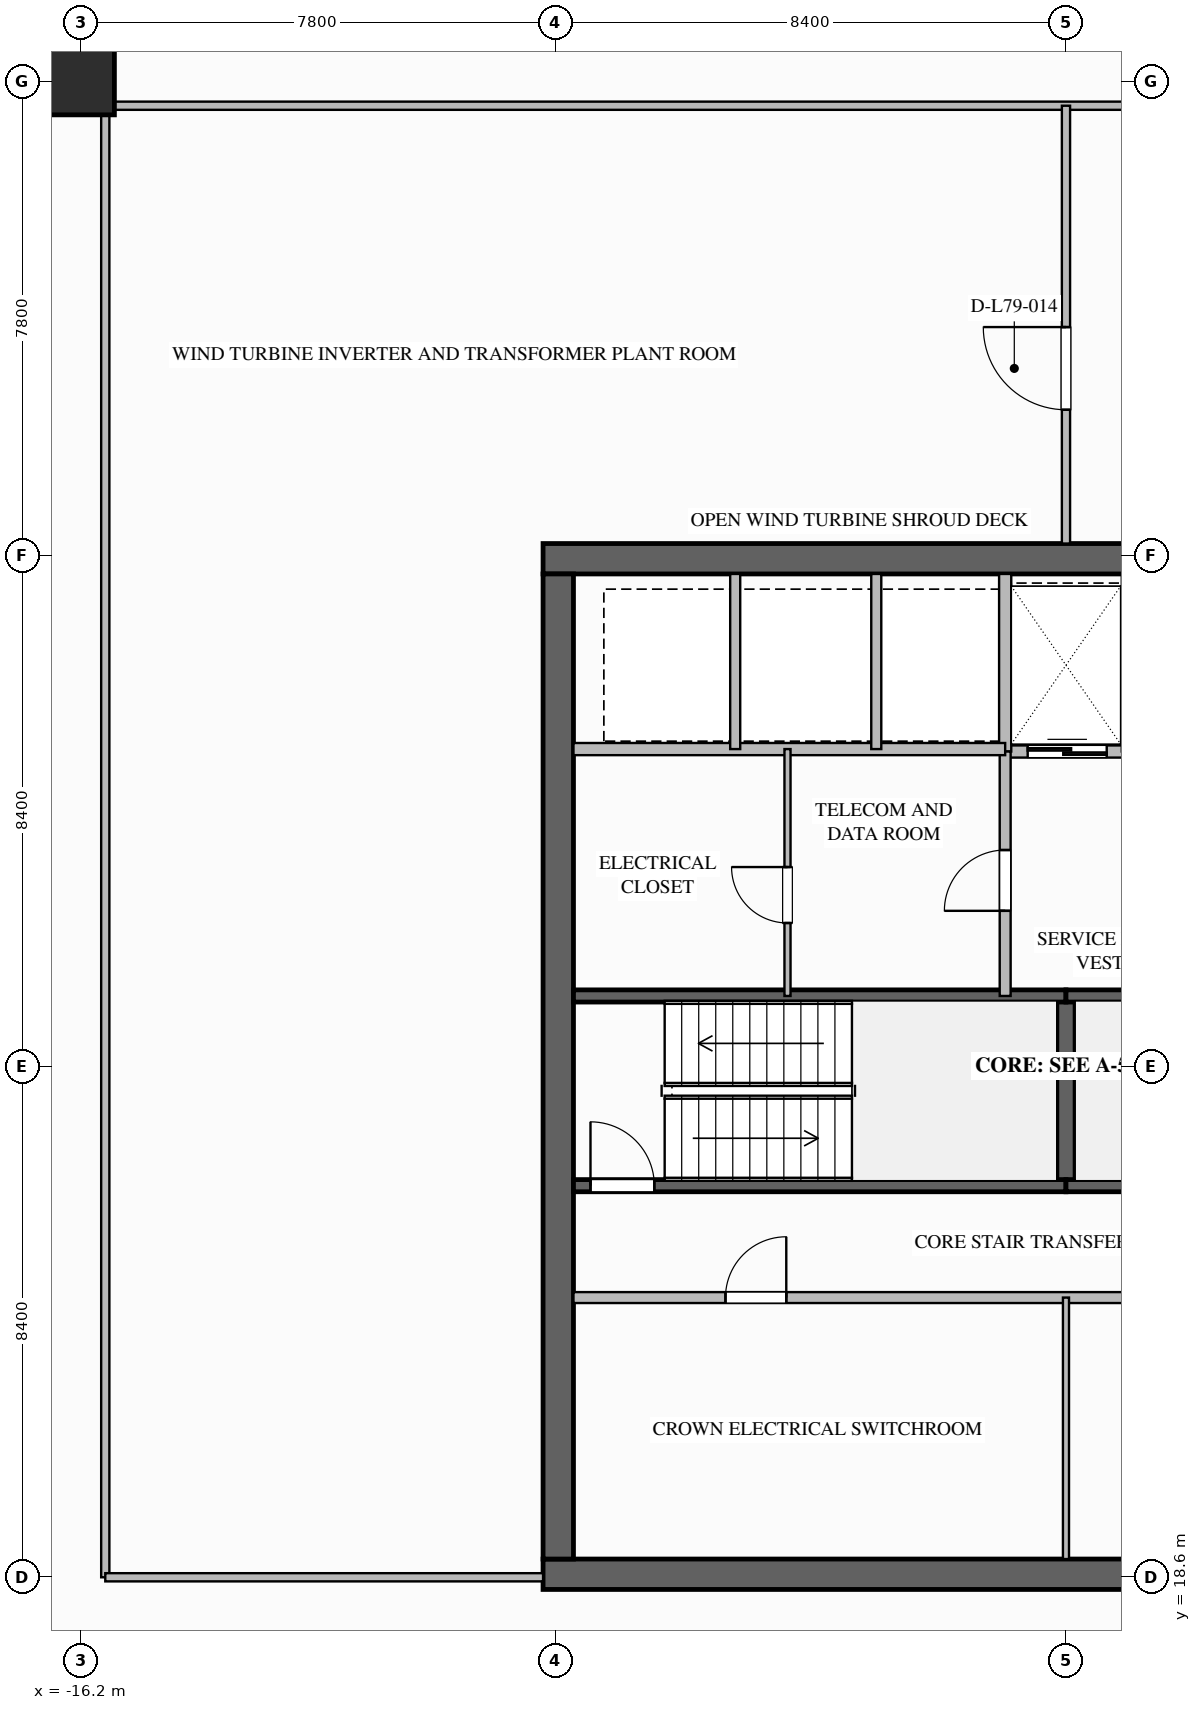
"""IFC4 building model, lengths in metres.
Left out: names, types, materials, properties, quantities, classifications, styles, units other than length and angle.
Written with IfcOpenShell. Run it as: python <this file> out.ifc"""

import sys

from ifc_helpers import new_model, si_unit, direction, frame, frame_2d, origin, origin_2d, place, context, subcontext, project, spatial, rectangle, extrude, element, fill, save


model = new_model("IFC4")
c1 = context("Model", 3, precision=1e-05, world=origin(), true_north=direction((0.0, 1.0)))
c2 = subcontext(c1, "Body", "Model", "MODEL_VIEW")
j1 = project(units=[si_unit("LENGTHUNIT", "METRE"), si_unit("PLANEANGLEUNIT", "RADIAN")], contexts=[c1])
p1 = place(None, origin())
s1 = spatial("IfcSite", under=j1, at=p1, CompositionType="ELEMENT")
p2 = place(p1, origin())
s2 = spatial("IfcBuilding", under=s1, at=p2, CompositionType="ELEMENT")
p3 = place(p2, frame((0.0, 0.0, 303.0)))
s3 = spatial("IfcBuildingStorey", under=s2, at=p3, CompositionType="ELEMENT", Elevation=303.0)
for number, where, z_axis, x_axis in (
    (1, (-8.6, 35.35, 0.0), (0.0, 0.0, 1.0), (1.0, 0.0, 0.0)),
    (2, (8.6, 18.65, 0.0), (0.0, 0.0, 1.0), (-1.0, 0.0, 0.0)),
):
    element("IfcWall", number, at=place(p3, frame(where, z_axis=z_axis, x_axis=x_axis)), inside=s3, PredefinedType="SHEAR", context=c2, shape_type="SweptSolid", body=[
        extrude(rectangle(XDim=17.2, YDim=0.5, at=frame_2d((8.6, 0.0))), origin(), (0.0, 0.0, 1.0), 4.2),
    ])
p4 = place(p3, frame((-8.35, 18.9, 0.0), z_axis=(0.0, 0.0, 1.0), x_axis=(0.0, 1.0, 0.0)))
e3 = element("IfcWall", 3, at=p4, inside=s3, PredefinedType="SHEAR", context=c2, shape_type="SweptSolid", body=[
    extrude(rectangle(XDim=16.2, YDim=0.5, at=frame_2d((8.1, 0.0))), origin(), (0.0, 0.0, 1.0), 4.2),
])
p5 = place(p3, frame((-16.2, 43.2, 0.0), z_axis=(0.0, 0.0, 1.0), x_axis=(1.0, 0.0, 0.0)))
e4 = element("IfcColumn", 4, at=p5, inside=s3, PredefinedType="COLUMN", context=c2, shape_type="SweptSolid", body=[
    extrude(rectangle(XDim=1.1, YDim=1.1, at=origin_2d()), origin(), (0.0, 0.0, 1.0), 4.2),
])
p6 = place(p3, frame((0.0, 25.04, 0.0), z_axis=(0.0, 0.0, 1.0), x_axis=(0.0, 1.0, 0.0)))
e5 = element("IfcWall", 5, at=p6, inside=s3, PredefinedType="SOLIDWALL", context=c2, shape_type="SweptSolid", body=[
    extrude(rectangle(XDim=3.12, YDim=0.3, at=frame_2d((1.56, 0.0))), origin(), (0.0, 0.0, 1.0), 3.85),
])
p7 = place(p3, frame((-8.1, 25.04, 0.0), z_axis=(0.0, 0.0, 1.0), x_axis=(1.0, 0.0, 0.0)))
e6 = element("IfcWall", 6, at=p7, inside=s3, PredefinedType="SOLIDWALL", context=c2, shape_type="SweptSolid", body=[
    extrude(rectangle(XDim=8.1, YDim=0.2, at=frame_2d((4.05, 0.0))), origin(), (0.0, 0.0, 1.0), 3.85),
])
p8 = place(p7, frame((0.28, 0.0, 0.0)))
e7 = element("IfcOpeningElement", 7, at=p8, cuts=e6, PredefinedType="OPENING", context=c2, shape_type="SweptSolid", body=[
    extrude(rectangle(XDim=1.05, YDim=2.1, at=frame_2d((0.525, 1.05))), frame((0.0, 0.11, 0.0), z_axis=(0.0, -1.0, 0.0), x_axis=(1.0, 0.0, 0.0)), (0.0, 0.0, 1.0), 0.22),
])
for number, where, z_axis, x_axis in (
    (8, (-8.1, 28.16, 0.0), (0.0, 0.0, 1.0), (1.0, 0.0, 0.0)),
    (9, (0.0, 25.04, 0.0), (0.0, 0.0, 1.0), (1.0, 0.0, 0.0)),
):
    element("IfcWall", number, at=place(p3, frame(where, z_axis=z_axis, x_axis=x_axis)), inside=s3, PredefinedType="SOLIDWALL", context=c2, shape_type="SweptSolid", body=[
        extrude(rectangle(XDim=8.1, YDim=0.2, at=frame_2d((4.05, 0.0))), origin(), (0.0, 0.0, 1.0), 3.85),
    ])
p9 = place(p3, frame((8.1, 28.16, 0.0), z_axis=(0.0, 0.0, 1.0), x_axis=(-1.0, 0.0, 0.0)))
e10 = element("IfcWall", 10, at=p9, inside=s3, PredefinedType="SOLIDWALL", context=c2, shape_type="SweptSolid", body=[
    extrude(rectangle(XDim=8.1, YDim=0.2, at=frame_2d((4.05, 0.0))), origin(), (0.0, 0.0, 1.0), 3.85),
])
p10 = place(p9, frame((0.28, 0.0, 0.0)))
e11 = element("IfcOpeningElement", 11, at=p10, cuts=e10, PredefinedType="OPENING", context=c2, shape_type="SweptSolid", body=[
    extrude(rectangle(XDim=1.05, YDim=2.1, at=frame_2d((0.525, 1.05))), frame((0.0, 0.11, 0.0), z_axis=(0.0, -1.0, 0.0), x_axis=(1.0, 0.0, 0.0)), (0.0, 0.0, 1.0), 0.22),
])
p11 = place(p3, frame((-1.0, 32.18, 0.0), z_axis=(0.0, 0.0, 1.0), x_axis=(1.0, 0.0, 0.0)))
e12 = element("IfcWall", 12, at=p11, inside=s3, PredefinedType="SOLIDWALL", context=c2, shape_type="SweptSolid", body=[
    extrude(rectangle(XDim=4.1, YDim=0.2, at=frame_2d((2.05, 0.0))), origin(), (0.0, 0.0, 1.0), 3.85),
])
p12 = place(p11, frame((0.37, 0.0, 0.0)))
e13 = element("IfcOpeningElement", 13, at=p12, cuts=e12, PredefinedType="OPENING", context=c2, shape_type="SweptSolid", body=[
    extrude(rectangle(XDim=1.3, YDim=2.2, at=frame_2d((0.65, 1.1))), frame((0.0, 0.11, 0.0), z_axis=(0.0, -1.0, 0.0), x_axis=(1.0, 0.0, 0.0)), (0.0, 0.0, 1.0), 0.22),
])
p13 = place(p11, frame((2.33, 0.0, 0.0)))
e14 = element("IfcOpeningElement", 14, at=p13, cuts=e12, PredefinedType="OPENING", context=c2, shape_type="SweptSolid", body=[
    extrude(rectangle(XDim=1.3, YDim=2.2, at=frame_2d((0.65, 1.1))), frame((0.0, 0.11, 0.0), z_axis=(0.0, -1.0, 0.0), x_axis=(1.0, 0.0, 0.0)), (0.0, 0.0, 1.0), 0.22),
])
p14 = place(p3, frame((-1.0, 32.18, 0.0), z_axis=(0.0, 0.0, 1.0), x_axis=(0.0, 1.0, 0.0)))
e15 = element("IfcWall", 15, at=p14, inside=s3, PredefinedType="SOLIDWALL", context=c2, shape_type="SweptSolid", body=[
    extrude(rectangle(XDim=2.92, YDim=0.2, at=frame_2d((1.46, 0.0))), origin(), (0.0, 0.0, 1.0), 3.85),
])
p15 = place(p3, frame((-1.0, 28.16, 0.0), z_axis=(0.0, 0.0, 1.0), x_axis=(0.0, 1.0, 0.0)))
e16 = element("IfcWall", 16, at=p15, inside=s3, PredefinedType="SOLIDWALL", context=c2, shape_type="SweptSolid", body=[
    extrude(rectangle(XDim=4.02, YDim=0.18, at=frame_2d((2.01, 0.0))), origin(), (0.0, 0.0, 1.0), 3.85),
])
p16 = place(p15, frame((1.4, 0.0, 0.0)))
e17 = element("IfcOpeningElement", 17, at=p16, cuts=e16, PredefinedType="OPENING", context=c2, shape_type="SweptSolid", body=[
    extrude(rectangle(XDim=1.0, YDim=2.1, at=frame_2d((0.5, 1.05))), frame((0.0, 0.1, 0.0), z_axis=(0.0, -1.0, 0.0), x_axis=(1.0, 0.0, 0.0)), (0.0, 0.0, 1.0), 0.2),
])
p17 = place(p3, frame((-8.1, 32.22, 0.0), z_axis=(0.0, 0.0, 1.0), x_axis=(1.0, 0.0, 0.0)))
e18 = element("IfcWall", 18, at=p17, inside=s3, PredefinedType="SOLIDWALL", context=c2, shape_type="SweptSolid", body=[
    extrude(rectangle(XDim=7.1, YDim=0.2, at=frame_2d((3.55, 0.0))), origin(), (0.0, 0.0, 1.0), 3.85),
])
for number, where, z_axis, x_axis in (
    (19, (-5.44, 32.22, 0.0), (0.0, 0.0, 1.0), (0.0, 1.0, 0.0)),
    (20, (-3.12, 32.22, 0.0), (0.0, 0.0, 1.0), (0.0, 1.0, 0.0)),
):
    element("IfcWall", number, at=place(p3, frame(where, z_axis=z_axis, x_axis=x_axis)), inside=s3, PredefinedType="PARTITIONING", context=c2, shape_type="SweptSolid", body=[
        extrude(rectangle(XDim=2.88, YDim=0.165, at=frame_2d((1.44, 0.0))), origin(), (0.0, 0.0, 1.0), 3.85),
    ])
p18 = place(p3, frame((-4.58, 28.16, 0.0), z_axis=(0.0, 0.0, 1.0), x_axis=(0.0, 1.0, 0.0)))
e21 = element("IfcWall", 21, at=p18, inside=s3, PredefinedType="PARTITIONING", context=c2, shape_type="SweptSolid", body=[
    extrude(rectangle(XDim=4.06, YDim=0.1, at=frame_2d((2.03, 0.0))), origin(), (0.0, 0.0, 1.0), 3.85),
])
p19 = place(p18, frame((1.2, 0.0, 0.0)))
e22 = element("IfcOpeningElement", 22, at=p19, cuts=e21, PredefinedType="OPENING", context=c2, shape_type="SweptSolid", body=[
    extrude(rectangle(XDim=0.92, YDim=2.1, at=frame_2d((0.46, 1.05))), frame((0.0, 0.06, 0.0), z_axis=(0.0, -1.0, 0.0), x_axis=(1.0, 0.0, 0.0)), (0.0, 0.0, 1.0), 0.12),
])
p20 = place(p3, frame((-8.1, 23.2, 0.0), z_axis=(0.0, 0.0, 1.0), x_axis=(1.0, 0.0, 0.0)))
e23 = element("IfcWall", 23, at=p20, inside=s3, PredefinedType="SOLIDWALL", context=c2, shape_type="SweptSolid", body=[
    extrude(rectangle(XDim=16.2, YDim=0.18, at=frame_2d((8.1, 0.0))), origin(), (0.0, 0.0, 1.0), 3.85),
])
p21 = place(p20, frame((2.5, 0.0, 0.0)))
e24 = element("IfcOpeningElement", 24, at=p21, cuts=e23, PredefinedType="OPENING", context=c2, shape_type="SweptSolid", body=[
    extrude(rectangle(XDim=1.0, YDim=2.1, at=frame_2d((0.5, 1.05))), frame((0.0, 0.1, 0.0), z_axis=(0.0, -1.0, 0.0), x_axis=(1.0, 0.0, 0.0)), (0.0, 0.0, 1.0), 0.2),
])
p22 = place(p20, frame((11.0, 0.0, 0.0)))
e25 = element("IfcOpeningElement", 25, at=p22, cuts=e23, PredefinedType="OPENING", context=c2, shape_type="SweptSolid", body=[
    extrude(rectangle(XDim=1.0, YDim=2.1, at=frame_2d((0.5, 1.05))), frame((0.0, 0.1, 0.0), z_axis=(0.0, -1.0, 0.0), x_axis=(1.0, 0.0, 0.0)), (0.0, 0.0, 1.0), 0.2),
])
p23 = place(p3, frame((0.0, 18.9, 0.0), z_axis=(0.0, 0.0, 1.0), x_axis=(0.0, 1.0, 0.0)))
e26 = element("IfcWall", 26, at=p23, inside=s3, PredefinedType="PARTITIONING", context=c2, shape_type="SweptSolid", body=[
    extrude(rectangle(XDim=4.3, YDim=0.1, at=frame_2d((2.15, 0.0))), origin(), (0.0, 0.0, 1.0), 3.85),
])
p24 = place(p3, frame((-15.8, 18.6, 0.0), z_axis=(0.0, 0.0, 1.0), x_axis=(0.0, 1.0, 0.0)))
e27 = element("IfcWall", 27, at=p24, inside=s3, PredefinedType="PARTITIONING", context=c2, shape_type="SweptSolid", body=[
    extrude(rectangle(XDim=24.2, YDim=0.135, at=frame_2d((12.1, 0.0))), origin(), (0.0, 0.0, 1.0), 3.85),
])
p25 = place(p3, frame((-15.8, 42.8, 0.0), z_axis=(0.0, 0.0, 1.0), x_axis=(1.0, 0.0, 0.0)))
e28 = element("IfcWall", 28, at=p25, inside=s3, PredefinedType="PARTITIONING", context=c2, shape_type="SweptSolid", body=[
    extrude(rectangle(XDim=31.6, YDim=0.135, at=frame_2d((15.8, 0.0))), origin(), (0.0, 0.0, 1.0), 3.85),
])
p26 = place(p3, frame((-15.8, 18.6, 0.0), z_axis=(0.0, 0.0, 1.0), x_axis=(1.0, 0.0, 0.0)))
e29 = element("IfcWall", 29, at=p26, inside=s3, PredefinedType="PARTITIONING", context=c2, shape_type="SweptSolid", body=[
    extrude(rectangle(XDim=7.2, YDim=0.135, at=frame_2d((3.6, 0.0))), origin(), (0.0, 0.0, 1.0), 3.227),
])
p27 = place(p3, frame((0.0, 35.6, 0.0), z_axis=(0.0, 0.0, 1.0), x_axis=(0.0, 1.0, 0.0)))
e30 = element("IfcWall", 30, at=p27, inside=s3, PredefinedType="PARTITIONING", context=c2, shape_type="SweptSolid", body=[
    extrude(rectangle(XDim=7.2, YDim=0.135, at=frame_2d((3.6, 0.0))), origin(), (0.0, 0.0, 1.0), 3.227),
])
p28 = place(p27, frame((2.2, 0.0, 0.0)))
e31 = element("IfcOpeningElement", 31, at=p28, cuts=e30, PredefinedType="OPENING", context=c2, shape_type="SweptSolid", body=[
    extrude(rectangle(XDim=1.36, YDim=2.2, at=frame_2d((0.68, 1.1))), frame((0.0, 0.077, 0.0), z_axis=(0.0, -1.0, 0.0), x_axis=(1.0, 0.0, 0.0)), (0.0, 0.0, 1.0), 0.155),
])
p29 = place(p8, origin())
e32 = element("IfcDoor", 32, at=p29, inside=s3, OperationType="SINGLE_SWING_LEFT", PredefinedType="DOOR", context=c2, shape_type="SweptSolid", body=[
    extrude(rectangle(XDim=1.05, YDim=2.1, at=frame_2d((0.525, 1.05))), frame((0.0, 0.025, 0.0), z_axis=(0.0, -1.0, 0.0), x_axis=(1.0, 0.0, 0.0)), (0.0, 0.0, 1.0), 0.05),
])
fill(e7, e32)
p30 = place(p12, origin())
e33 = element("IfcDoor", 33, at=p30, inside=s3, OperationType="SLIDING_TO_LEFT", PredefinedType="DOOR", context=c2, shape_type="SweptSolid", body=[
    extrude(rectangle(XDim=1.3, YDim=2.2, at=frame_2d((0.65, 1.1))), frame((0.0, 0.025, 0.0), z_axis=(0.0, -1.0, 0.0), x_axis=(1.0, 0.0, 0.0)), (0.0, 0.0, 1.0), 0.05),
])
fill(e13, e33)
p31 = place(p16, origin())
e34 = element("IfcDoor", 34, at=p31, inside=s3, OperationType="SINGLE_SWING_LEFT", PredefinedType="DOOR", context=c2, shape_type="SweptSolid", body=[
    extrude(rectangle(XDim=1.0, YDim=2.1, at=frame_2d((0.5, 1.05))), frame((0.0, 0.025, 0.0), z_axis=(0.0, -1.0, 0.0), x_axis=(1.0, 0.0, 0.0)), (0.0, 0.0, 1.0), 0.05),
])
fill(e17, e34)
p32 = place(p19, origin())
e35 = element("IfcDoor", 35, at=p32, inside=s3, OperationType="SINGLE_SWING_RIGHT", PredefinedType="DOOR", context=c2, shape_type="SweptSolid", body=[
    extrude(rectangle(XDim=0.92, YDim=2.1, at=frame_2d((0.46, 1.05))), frame((0.0, 0.025, 0.0), z_axis=(0.0, -1.0, 0.0), x_axis=(1.0, 0.0, 0.0)), (0.0, 0.0, 1.0), 0.05),
])
fill(e22, e35)
p33 = place(p21, origin())
e36 = element("IfcDoor", 36, at=p33, inside=s3, OperationType="SINGLE_SWING_RIGHT", PredefinedType="DOOR", context=c2, shape_type="SweptSolid", body=[
    extrude(rectangle(XDim=1.0, YDim=2.1, at=frame_2d((0.5, 1.05))), frame((0.0, 0.025, 0.0), z_axis=(0.0, -1.0, 0.0), x_axis=(1.0, 0.0, 0.0)), (0.0, 0.0, 1.0), 0.05),
])
fill(e24, e36)
p34 = place(p28, origin())
e37 = element("IfcDoor", 37, at=p34, inside=s3, OperationType="SINGLE_SWING_RIGHT", PredefinedType="DOOR", context=c2, shape_type="SweptSolid", body=[
    extrude(rectangle(XDim=1.36, YDim=2.2, at=frame_2d((0.68, 1.1))), frame((0.0, 0.025, 0.0), z_axis=(0.0, -1.0, 0.0), x_axis=(1.0, 0.0, 0.0)), (0.0, 0.0, 1.0), 0.05),
])
fill(e31, e37)
save(model, sys.argv[1])
